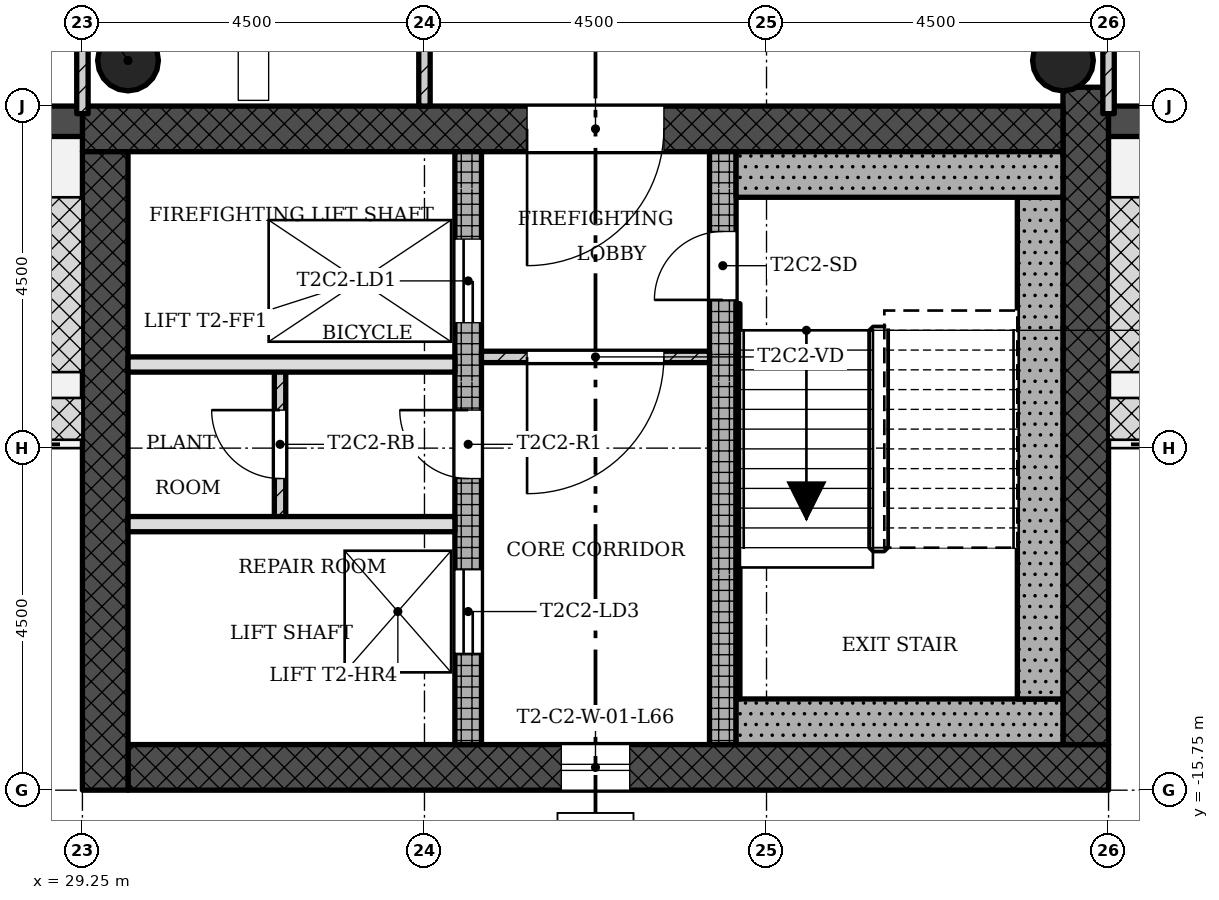
"""IFC4 building model, lengths in metres.
Left out: names, types, materials, properties, quantities, classifications, styles, units other than length and angle.
Written with IfcOpenShell. Run it as: python <this file> out.ifc"""

import sys

from ifc_helpers import new_model, si_unit, direction, frame, frame_2d, origin, origin_2d, place, context, subcontext, project, spatial, rectangle, hollow_circle, extrude, element, fill, save


model = new_model("IFC4")
c1 = context("Model", 3, precision=1e-05, world=origin(), true_north=direction((0.0, 1.0)))
c2 = subcontext(c1, "Body", "Model", "MODEL_VIEW")
j1 = project(units=[si_unit("LENGTHUNIT", "METRE"), si_unit("PLANEANGLEUNIT", "RADIAN")], contexts=[c1])
p1 = place(None, origin())
s1 = spatial("IfcSite", under=j1, at=p1, CompositionType="ELEMENT")
p2 = place(p1, origin())
s2 = spatial("IfcBuilding", under=s1, at=p2, CompositionType="ELEMENT")
p3 = place(p2, frame((0.0, 0.0, 237.9)))
s3 = spatial("IfcBuildingStorey", under=s2, at=p3, CompositionType="ELEMENT", Elevation=237.9)
p4 = place(p3, frame((29.85, -15.45, 0.0), z_axis=(0.0, 0.0, 1.0), x_axis=(1.0, 0.0, 0.0)))
e1 = element("IfcWall", 1, at=p4, inside=s3, PredefinedType="SHEAR", context=c2, shape_type="SweptSolid", body=[
    extrude(rectangle(XDim=12.9, YDim=0.6, at=frame_2d((6.45, 0.0))), origin(), (0.0, 0.0, 1.0), 4.5),
])
p5 = place(p4, frame((5.7, 0.0, 0.45)))
e2 = element("IfcOpeningElement", 2, at=p5, cuts=e1, PredefinedType="OPENING", context=c2, shape_type="SweptSolid", body=[
    extrude(rectangle(XDim=0.9, YDim=2.4, at=frame_2d((0.45, 1.2))), frame((0.0, 0.31, 0.0), z_axis=(0.0, -1.0, 0.0), x_axis=(1.0, 0.0, 0.0)), (0.0, 0.0, 1.0), 0.62),
])
p6 = place(p3, frame((42.45, -15.15, 0.0), z_axis=(0.0, 0.0, 1.0), x_axis=(0.0, 1.0, 0.0)))
e3 = element("IfcWall", 3, at=p6, inside=s3, PredefinedType="SHEAR", context=c2, shape_type="SweptSolid", body=[
    extrude(rectangle(XDim=8.648, YDim=0.6, at=frame_2d((4.324, 0.0))), origin(), (0.0, 0.0, 1.0), 4.5),
])
p7 = place(p3, frame((42.15, -7.05, 0.0), z_axis=(0.0, 0.0, 1.0), x_axis=(-1.0, 0.0, 0.0)))
e4 = element("IfcWall", 4, at=p7, inside=s3, PredefinedType="SHEAR", context=c2, shape_type="SweptSolid", body=[
    extrude(rectangle(XDim=12.9, YDim=0.6, at=frame_2d((6.45, 0.0))), origin(), (0.0, 0.0, 1.0), 4.5),
])
p8 = place(p7, frame((5.25, 0.0, 0.0)))
e5 = element("IfcOpeningElement", 5, at=p8, cuts=e4, PredefinedType="OPENING", context=c2, shape_type="SweptSolid", body=[
    extrude(rectangle(XDim=1.8, YDim=2.1, at=frame_2d((0.9, 1.05))), frame((0.0, 0.31, 0.0), z_axis=(0.0, -1.0, 0.0), x_axis=(1.0, 0.0, 0.0)), (0.0, 0.0, 1.0), 0.62),
])
p9 = place(p3, frame((29.55, -7.35, 0.0), z_axis=(0.0, 0.0, 1.0), x_axis=(0.0, -1.0, 0.0)))
e6 = element("IfcWall", 6, at=p9, inside=s3, PredefinedType="SHEAR", context=c2, shape_type="SweptSolid", body=[
    extrude(rectangle(XDim=8.4, YDim=0.6, at=frame_2d((4.2, 0.0))), origin(), (0.0, 0.0, 1.0), 4.5),
])
p10 = place(p3, frame((34.325, -15.15, 0.0), z_axis=(0.0, 0.0, 1.0), x_axis=(0.0, 1.0, 0.0)))
e7 = element("IfcWall", 7, at=p10, inside=s3, PredefinedType="SHEAR", context=c2, shape_type="SweptSolid", body=[
    extrude(rectangle(XDim=7.8, YDim=0.35, at=frame_2d((3.9, 0.0))), origin(), (0.0, 0.0, 1.0), 4.5),
])
p11 = place(p10, frame((5.55, 0.0, 0.0)))
e8 = element("IfcOpeningElement", 8, at=p11, cuts=e7, PredefinedType="OPENING", context=c2, shape_type="SweptSolid", body=[
    extrude(rectangle(XDim=1.1, YDim=2.1, at=frame_2d((0.55, 1.05))), frame((0.0, 0.185, 0.0), z_axis=(0.0, -1.0, 0.0), x_axis=(1.0, 0.0, 0.0)), (0.0, 0.0, 1.0), 0.37),
])
p12 = place(p10, frame((1.2, 0.0, 0.0)))
e9 = element("IfcOpeningElement", 9, at=p12, cuts=e7, PredefinedType="OPENING", context=c2, shape_type="SweptSolid", body=[
    extrude(rectangle(XDim=1.1, YDim=2.1, at=frame_2d((0.55, 1.05))), frame((0.0, 0.185, 0.0), z_axis=(0.0, -1.0, 0.0), x_axis=(1.0, 0.0, 0.0)), (0.0, 0.0, 1.0), 0.37),
])
p13 = place(p10, frame((3.5, 0.0, 0.0)))
e10 = element("IfcOpeningElement", 10, at=p13, cuts=e7, PredefinedType="OPENING", context=c2, shape_type="SweptSolid", body=[
    extrude(rectangle(XDim=0.9, YDim=2.1, at=frame_2d((0.45, 1.05))), frame((0.0, 0.185, 0.0), z_axis=(0.0, -1.0, 0.0), x_axis=(1.0, 0.0, 0.0)), (0.0, 0.0, 1.0), 0.37),
])
p14 = place(p3, frame((37.675, -15.15, 0.0), z_axis=(0.0, 0.0, 1.0), x_axis=(0.0, 1.0, 0.0)))
e11 = element("IfcWall", 11, at=p14, inside=s3, PredefinedType="SHEAR", context=c2, shape_type="SweptSolid", body=[
    extrude(rectangle(XDim=7.8, YDim=0.35, at=frame_2d((3.9, 0.0))), origin(), (0.0, 0.0, 1.0), 4.5),
])
p15 = place(p14, frame((5.85, 0.0, 0.0)))
e12 = element("IfcOpeningElement", 12, at=p15, cuts=e11, PredefinedType="OPENING", context=c2, shape_type="SweptSolid", body=[
    extrude(rectangle(XDim=0.9, YDim=2.1, at=frame_2d((0.45, 1.05))), frame((0.0, 0.185, 0.0), z_axis=(0.0, -1.0, 0.0), x_axis=(1.0, 0.0, 0.0)), (0.0, 0.0, 1.0), 0.37),
])
for number, where, z_axis, x_axis in (
    (13, (42.15, -6.15, 0.0), (0.0, 0.0, 1.0), (1.0, 0.0, 0.0)),
    (14, (29.85, -6.15, 0.0), (0.0, 0.0, 1.0), (1.0, 0.0, 0.0)),
):
    element("IfcColumn", number, at=place(p3, frame(where, z_axis=z_axis, x_axis=x_axis)), inside=s3, PredefinedType="COLUMN", context=c2, shape_type="SweptSolid", body=[
        extrude(hollow_circle(Radius=0.4, WallThickness=0.028, at=origin_2d()), origin(), (0.0, 0.0, 1.0), 4.5),
    ])
p16 = place(p3, frame((42.75, -6.95, -0.02), z_axis=(0.0, 0.0, 1.0), x_axis=(1.0, 0.0, 0.0)))
e15 = element("IfcWall", 15, at=p16, inside=s3, PredefinedType="STANDARD", context=c2, shape_type="SweptSolid", body=[
    extrude(rectangle(XDim=4.5, YDim=0.4, at=frame_2d((2.25, 0.0))), origin(), (0.0, 0.0, 1.0), 4.22),
])
p17 = place(p16, frame((1.35, 0.0, 0.02)))
e16 = element("IfcOpeningElement", 16, at=p17, cuts=e15, PredefinedType="OPENING", context=c2, shape_type="SweptSolid", body=[
    extrude(rectangle(XDim=1.8, YDim=2.1, at=frame_2d((0.9, 1.05))), frame((0.0, 0.21, 0.0), z_axis=(0.0, -1.0, 0.0), x_axis=(1.0, 0.0, 0.0)), (0.0, 0.0, 1.0), 0.42),
])
p18 = place(p3, frame((24.75, -6.95, -0.02), z_axis=(0.0, 0.0, 1.0), x_axis=(1.0, 0.0, 0.0)))
e17 = element("IfcWall", 17, at=p18, inside=s3, PredefinedType="STANDARD", context=c2, shape_type="SweptSolid", body=[
    extrude(rectangle(XDim=4.5, YDim=0.4, at=frame_2d((2.25, 0.0))), origin(), (0.0, 0.0, 1.0), 4.22),
])
p19 = place(p18, frame((1.35, 0.0, 0.02)))
e18 = element("IfcOpeningElement", 18, at=p19, cuts=e17, PredefinedType="OPENING", context=c2, shape_type="SweptSolid", body=[
    extrude(rectangle(XDim=1.8, YDim=2.1, at=frame_2d((0.9, 1.05))), frame((0.0, 0.21, 0.0), z_axis=(0.0, -1.0, 0.0), x_axis=(1.0, 0.0, 0.0)), (0.0, 0.0, 1.0), 0.42),
])
p20 = place(p3, frame((34.5, -10.05, 0.0), z_axis=(0.0, 0.0, 1.0), x_axis=(1.0, 0.0, 0.0)))
e19 = element("IfcWall", 19, at=p20, inside=s3, PredefinedType="PARTITIONING", context=c2, shape_type="SweptSolid", body=[
    extrude(rectangle(XDim=3.0, YDim=0.15, at=frame_2d((1.5, 0.0))), origin(), (0.0, 0.0, 1.0), 4.1),
])
p21 = place(p20, frame((0.6, 0.0, 0.0)))
e20 = element("IfcOpeningElement", 20, at=p21, cuts=e19, PredefinedType="OPENING", context=c2, shape_type="SweptSolid", body=[
    extrude(rectangle(XDim=1.8, YDim=2.1, at=frame_2d((0.9, 1.05))), frame((0.0, 0.085, 0.0), z_axis=(0.0, -1.0, 0.0), x_axis=(1.0, 0.0, 0.0)), (0.0, 0.0, 1.0), 0.17),
])
for number, where, z_axis, x_axis in (
    (21, (29.85, -12.25, 0.0), (0.0, 0.0, 1.0), (1.0, 0.0, 0.0)),
    (22, (29.85, -10.15, 0.0), (0.0, 0.0, 1.0), (1.0, 0.0, 0.0)),
):
    element("IfcWall", number, at=place(p3, frame(where, z_axis=z_axis, x_axis=x_axis)), inside=s3, PredefinedType="SOLIDWALL", context=c2, shape_type="SweptSolid", body=[
        extrude(rectangle(XDim=4.3, YDim=0.2, at=frame_2d((2.15, 0.0))), origin(), (0.0, 0.0, 1.0), 4.1),
    ])
p22 = place(p3, frame((31.85, -10.15, 0.0), z_axis=(0.0, 0.0, 1.0), x_axis=(0.0, -1.0, 0.0)))
e23 = element("IfcWall", 23, at=p22, inside=s3, PredefinedType="PARTITIONING", context=c2, shape_type="SweptSolid", body=[
    extrude(rectangle(XDim=2.1, YDim=0.15, at=frame_2d((1.05, 0.0))), origin(), (0.0, 0.0, 1.0), 4.1),
])
p23 = place(p22, frame((0.6, 0.0, 0.0)))
e24 = element("IfcOpeningElement", 24, at=p23, cuts=e23, PredefinedType="OPENING", context=c2, shape_type="SweptSolid", body=[
    extrude(rectangle(XDim=0.9, YDim=2.1, at=frame_2d((0.45, 1.05))), frame((0.0, 0.085, 0.0), z_axis=(0.0, -1.0, 0.0), x_axis=(1.0, 0.0, 0.0)), (0.0, 0.0, 1.0), 0.17),
])
p24 = place(p3, frame((33.75, -6.75, 0.0), z_axis=(0.0, 0.0, 1.0), x_axis=(0.0, 1.0, 0.0)))
e25 = element("IfcWall", 25, at=p24, inside=s3, PredefinedType="PARTITIONING", context=c2, shape_type="SweptSolid", body=[
    extrude(rectangle(XDim=2.25, YDim=0.15, at=frame_2d((1.125, 0.0))), origin(), (0.0, 0.0, 1.0), 4.1),
])
p25 = place(p3, frame((29.25, -6.85, 0.0), z_axis=(0.0, 0.0, 1.0), x_axis=(0.0, 1.0, 0.0)))
e26 = element("IfcWall", 26, at=p25, inside=s3, PredefinedType="PARTITIONING", context=c2, shape_type="SweptSolid", body=[
    extrude(rectangle(XDim=13.7, YDim=0.15, at=frame_2d((6.85, 0.0))), origin(), (0.0, 0.0, 1.0), 4.1),
])
p26 = place(p25, frame((5.95, 0.0, 0.0)))
e27 = element("IfcOpeningElement", 27, at=p26, cuts=e26, PredefinedType="OPENING", context=c2, shape_type="SweptSolid", body=[
    extrude(rectangle(XDim=1.8, YDim=2.1, at=frame_2d((0.9, 1.05))), frame((0.0, 0.085, 0.0), z_axis=(0.0, -1.0, 0.0), x_axis=(1.0, 0.0, 0.0)), (0.0, 0.0, 1.0), 0.17),
])
p27 = place(p3, frame((42.75, -6.85, 0.0), z_axis=(0.0, 0.0, 1.0), x_axis=(0.0, 1.0, 0.0)))
e28 = element("IfcWall", 28, at=p27, inside=s3, PredefinedType="PARTITIONING", context=c2, shape_type="SweptSolid", body=[
    extrude(rectangle(XDim=13.7, YDim=0.15, at=frame_2d((6.85, 0.0))), origin(), (0.0, 0.0, 1.0), 4.1),
])
p28 = place(p27, frame((5.95, 0.0, 0.0)))
e29 = element("IfcOpeningElement", 29, at=p28, cuts=e28, PredefinedType="OPENING", context=c2, shape_type="SweptSolid", body=[
    extrude(rectangle(XDim=1.8, YDim=2.1, at=frame_2d((0.9, 1.05))), frame((0.0, 0.085, 0.0), z_axis=(0.0, -1.0, 0.0), x_axis=(1.0, 0.0, 0.0)), (0.0, 0.0, 1.0), 0.17),
])
p29 = place(p3, frame((37.85, -14.85, 0.0), z_axis=(0.0, 0.0, 1.0), x_axis=(1.0, 0.0, 0.0)))
e30 = element("IfcWall", 30, at=p29, inside=s3, PredefinedType="SHEAR", context=c2, shape_type="SweptSolid", body=[
    extrude(rectangle(XDim=4.3, YDim=0.6, at=frame_2d((2.15, 0.0))), origin(), (0.0, 0.0, 1.0), 4.5),
])
p30 = place(p3, frame((41.85, -7.95, 0.0), z_axis=(0.0, 0.0, 1.0), x_axis=(0.0, -1.0, 0.0)))
e31 = element("IfcWall", 31, at=p30, inside=s3, PredefinedType="SHEAR", context=c2, shape_type="SweptSolid", body=[
    extrude(rectangle(XDim=6.6, YDim=0.6, at=frame_2d((3.3, 0.0))), origin(), (0.0, 0.0, 1.0), 4.5),
])
p31 = place(p3, frame((37.85, -7.65, 0.0), z_axis=(0.0, 0.0, 1.0), x_axis=(1.0, 0.0, 0.0)))
e32 = element("IfcWall", 32, at=p31, inside=s3, PredefinedType="SHEAR", context=c2, shape_type="SweptSolid", body=[
    extrude(rectangle(XDim=4.3, YDim=0.6, at=frame_2d((2.15, 0.0))), origin(), (0.0, 0.0, 1.0), 4.5),
])
p32 = place(p3, frame((37.875, -9.35, 0.0), z_axis=(0.0, 0.0, 1.0), x_axis=(0.0, -1.0, 0.0)))
e33 = element("IfcWall", 33, at=p32, inside=s3, PredefinedType="SHEAR", context=c2, shape_type="SweptSolid", body=[
    extrude(rectangle(XDim=5.2, YDim=0.05, at=frame_2d((2.6, 0.0))), origin(), (0.0, 0.0, 1.0), 4.5),
])
p33 = place(p5, origin())
e34 = element("IfcWindow", 34, at=p33, inside=s3, PartitioningType="SINGLE_PANEL", PredefinedType="WINDOW", context=c2, shape_type="SweptSolid", body=[
    extrude(rectangle(XDim=0.9, YDim=2.4, at=frame_2d((0.45, 1.2))), frame((0.0, 0.03, 0.0), z_axis=(0.0, -1.0, 0.0), x_axis=(1.0, 0.0, 0.0)), (0.0, 0.0, 1.0), 0.06),
])
fill(e2, e34)
p34 = place(p21, origin())
e35 = element("IfcDoor", 35, at=p34, inside=s3, OperationType="SINGLE_SWING_LEFT", PredefinedType="DOOR", context=c2, shape_type="SweptSolid", body=[
    extrude(rectangle(XDim=1.8, YDim=2.1, at=frame_2d((0.9, 1.05))), frame((0.0, 0.025, 0.0), z_axis=(0.0, -1.0, 0.0), x_axis=(1.0, 0.0, 0.0)), (0.0, 0.0, 1.0), 0.05),
])
fill(e20, e35)
p35 = place(p23, origin())
e36 = element("IfcDoor", 36, at=p35, inside=s3, OperationType="SINGLE_SWING_LEFT", PredefinedType="DOOR", context=c2, shape_type="SweptSolid", body=[
    extrude(rectangle(XDim=0.9, YDim=2.1, at=frame_2d((0.45, 1.05))), frame((0.0, 0.025, 0.0), z_axis=(0.0, -1.0, 0.0), x_axis=(1.0, 0.0, 0.0)), (0.0, 0.0, 1.0), 0.05),
])
fill(e24, e36)
p36 = place(p15, origin())
e37 = element("IfcDoor", 37, at=p36, inside=s3, OperationType="SINGLE_SWING_RIGHT", PredefinedType="DOOR", context=c2, shape_type="SweptSolid", body=[
    extrude(rectangle(XDim=0.9, YDim=2.1, at=frame_2d((0.45, 1.05))), frame((0.0, 0.025, 0.0), z_axis=(0.0, -1.0, 0.0), x_axis=(1.0, 0.0, 0.0)), (0.0, 0.0, 1.0), 0.05),
])
fill(e12, e37)
p37 = place(p11, origin())
e38 = element("IfcDoor", 38, at=p37, inside=s3, OperationType="SLIDING_TO_LEFT", PredefinedType="DOOR", context=c2, shape_type="SweptSolid", body=[
    extrude(rectangle(XDim=1.1, YDim=2.1, at=frame_2d((0.55, 1.05))), frame((0.0, 0.025, 0.0), z_axis=(0.0, -1.0, 0.0), x_axis=(1.0, 0.0, 0.0)), (0.0, 0.0, 1.0), 0.05),
])
fill(e8, e38)
p38 = place(p12, origin())
e39 = element("IfcDoor", 39, at=p38, inside=s3, OperationType="SLIDING_TO_LEFT", PredefinedType="DOOR", context=c2, shape_type="SweptSolid", body=[
    extrude(rectangle(XDim=1.1, YDim=2.1, at=frame_2d((0.55, 1.05))), frame((0.0, 0.025, 0.0), z_axis=(0.0, -1.0, 0.0), x_axis=(1.0, 0.0, 0.0)), (0.0, 0.0, 1.0), 0.05),
])
fill(e9, e39)
p39 = place(p13, origin())
e40 = element("IfcDoor", 40, at=p39, inside=s3, OperationType="SINGLE_SWING_LEFT", PredefinedType="DOOR", context=c2, shape_type="SweptSolid", body=[
    extrude(rectangle(XDim=0.9, YDim=2.1, at=frame_2d((0.45, 1.05))), frame((0.0, 0.025, 0.0), z_axis=(0.0, -1.0, 0.0), x_axis=(1.0, 0.0, 0.0)), (0.0, 0.0, 1.0), 0.05),
])
fill(e10, e40)
p40 = place(p8, origin())
e41 = element("IfcDoor", 41, at=p40, inside=s3, OperationType="SINGLE_SWING_LEFT", PredefinedType="DOOR", context=c2, shape_type="SweptSolid", body=[
    extrude(rectangle(XDim=1.8, YDim=2.1, at=frame_2d((0.9, 1.05))), frame((0.0, 0.025, 0.0), z_axis=(0.0, -1.0, 0.0), x_axis=(1.0, 0.0, 0.0)), (0.0, 0.0, 1.0), 0.05),
])
fill(e5, e41)
save(model, sys.argv[1])
